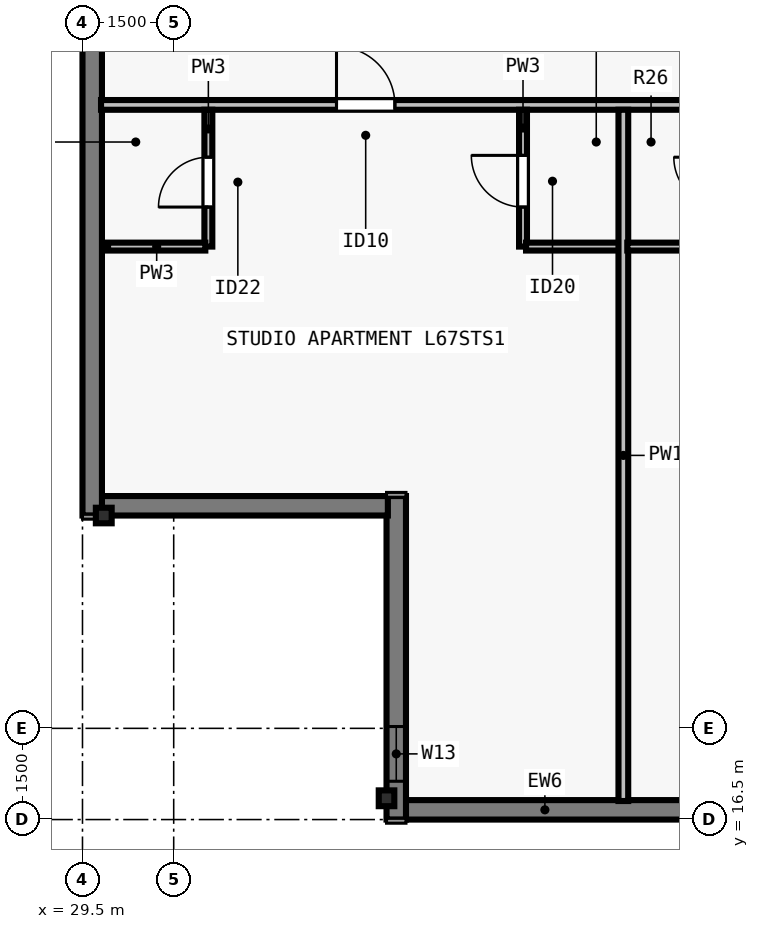
"""IFC4 building model, lengths in metres.
Left out: names, types, materials, properties, quantities, classifications, styles, units other than length and angle.
Written with IfcOpenShell. Run it as: python <this file> out.ifc"""

import sys

from ifc_helpers import new_model, si_unit, direction, frame, frame_2d, origin, origin_2d, place, context, subcontext, project, spatial, rectangle, i_section, extrude, element, fill, save


model = new_model("IFC4")
c1 = context("Model", 3, precision=1e-05, world=origin(), true_north=direction((0.0, 1.0)))
c2 = subcontext(c1, "Body", "Model", "MODEL_VIEW")
j1 = project(units=[si_unit("LENGTHUNIT", "METRE"), si_unit("PLANEANGLEUNIT", "RADIAN")], contexts=[c1])
p1 = place(None, origin())
s1 = spatial("IfcSite", under=j1, at=p1, CompositionType="ELEMENT")
p2 = place(p1, origin())
s2 = spatial("IfcBuilding", under=s1, at=p2, CompositionType="ELEMENT")
p3 = place(p2, frame((0.0, 0.0, 244.5)))
s3 = spatial("IfcBuildingStorey", under=s2, at=p3, CompositionType="ELEMENT", Elevation=244.5)
for number, where, z_axis, x_axis in (
    (1, (34.5, 16.85, 0.0), (0.0, 0.0, 1.0), (1.0, 0.0, 0.0)),
    (2, (29.85, 21.5, 0.0), (0.0, 0.0, 1.0), (0.0, 1.0, 0.0)),
):
    element("IfcColumn", number, at=place(p3, frame(where, z_axis=z_axis, x_axis=x_axis)), inside=s3, PredefinedType="COLUMN", context=c2, shape_type="SweptSolid", body=[
        extrude(i_section(OverallWidth=0.256, OverallDepth=0.26, WebThickness=0.01, FlangeThickness=0.017, FilletRadius=0.013, at=origin_2d()), origin(), (0.0, 0.0, 1.0), 3.5),
    ])
p4 = place(p3, frame((69.5, 16.66, 0.0), z_axis=(0.0, 0.0, 1.0), x_axis=(-1.0, 0.0, 0.0)))
e3 = element("IfcWall", 3, at=p4, inside=s3, PredefinedType="SOLIDWALL", context=c2, shape_type="SweptSolid", body=[
    extrude(rectangle(XDim=34.702, YDim=0.32, at=frame_2d((17.351, 0.0))), origin(), (0.0, 0.0, 1.0), 3.29),
])
p5 = place(p4, frame((4.613, 0.0, 0.8)))
e4 = element("IfcOpeningElement", 4, at=p5, cuts=e3, PredefinedType="OPENING", context=c2, shape_type="SweptSolid", body=[
    extrude(rectangle(XDim=1.85, YDim=1.678, at=frame_2d((0.925, 0.839))), frame((0.0, 0.17, 0.0), z_axis=(0.0, -1.0, 0.0), x_axis=(1.0, 0.0, 0.0)), (0.0, 0.0, 1.0), 0.34),
])
p6 = place(p4, frame((8.138, 0.0, 0.8)))
e5 = element("IfcOpeningElement", 5, at=p6, cuts=e3, PredefinedType="OPENING", context=c2, shape_type="SweptSolid", body=[
    extrude(rectangle(XDim=1.55, YDim=1.678, at=frame_2d((0.775, 0.839))), frame((0.0, 0.17, 0.0), z_axis=(0.0, -1.0, 0.0), x_axis=(1.0, 0.0, 0.0)), (0.0, 0.0, 1.0), 0.34),
])
p7 = place(p4, frame((10.113, 0.0, 0.8)))
e6 = element("IfcOpeningElement", 6, at=p7, cuts=e3, PredefinedType="OPENING", context=c2, shape_type="SweptSolid", body=[
    extrude(rectangle(XDim=1.85, YDim=1.678, at=frame_2d((0.925, 0.839))), frame((0.0, 0.17, 0.0), z_axis=(0.0, -1.0, 0.0), x_axis=(1.0, 0.0, 0.0)), (0.0, 0.0, 1.0), 0.34),
])
p8 = place(p4, frame((14.888, 0.0, 0.8)))
e7 = element("IfcOpeningElement", 7, at=p8, cuts=e3, PredefinedType="OPENING", context=c2, shape_type="SweptSolid", body=[
    extrude(rectangle(XDim=1.55, YDim=1.678, at=frame_2d((0.775, 0.839))), frame((0.0, 0.17, 0.0), z_axis=(0.0, -1.0, 0.0), x_axis=(1.0, 0.0, 0.0)), (0.0, 0.0, 1.0), 0.34),
])
p9 = place(p4, frame((18.114, 0.0, 0.8)))
e8 = element("IfcOpeningElement", 8, at=p9, cuts=e3, PredefinedType="OPENING", context=c2, shape_type="SweptSolid", body=[
    extrude(rectangle(XDim=1.85, YDim=1.678, at=frame_2d((0.925, 0.839))), frame((0.0, 0.17, 0.0), z_axis=(0.0, -1.0, 0.0), x_axis=(1.0, 0.0, 0.0)), (0.0, 0.0, 1.0), 0.34),
])
p10 = place(p4, frame((24.864, 0.0, 0.8)))
e9 = element("IfcOpeningElement", 9, at=p10, cuts=e3, PredefinedType="OPENING", context=c2, shape_type="SweptSolid", body=[
    extrude(rectangle(XDim=1.85, YDim=1.678, at=frame_2d((0.925, 0.839))), frame((0.0, 0.17, 0.0), z_axis=(0.0, -1.0, 0.0), x_axis=(1.0, 0.0, 0.0)), (0.0, 0.0, 1.0), 0.34),
])
p11 = place(p4, frame((28.389, 0.0, 0.8)))
e10 = element("IfcOpeningElement", 10, at=p11, cuts=e3, PredefinedType="OPENING", context=c2, shape_type="SweptSolid", body=[
    extrude(rectangle(XDim=1.55, YDim=1.678, at=frame_2d((0.775, 0.839))), frame((0.0, 0.17, 0.0), z_axis=(0.0, -1.0, 0.0), x_axis=(1.0, 0.0, 0.0)), (0.0, 0.0, 1.0), 0.34),
])
p12 = place(p3, frame((34.66, 16.5, 0.0), z_axis=(0.0, 0.0, 1.0), x_axis=(0.0, 1.0, 0.0)))
e11 = element("IfcWall", 11, at=p12, inside=s3, PredefinedType="SOLIDWALL", context=c2, shape_type="SweptSolid", body=[
    extrude(rectangle(XDim=5.32, YDim=0.32, at=frame_2d((2.66, 0.0))), origin(), (0.0, 0.0, 1.0), 3.29),
])
p13 = place(p12, frame((0.63, 0.0, 0.8)))
e12 = element("IfcOpeningElement", 12, at=p13, cuts=e11, PredefinedType="OPENING", context=c2, shape_type="SweptSolid", body=[
    extrude(rectangle(XDim=0.9, YDim=1.678, at=frame_2d((0.45, 0.839))), frame((0.0, 0.17, 0.0), z_axis=(0.0, -1.0, 0.0), x_axis=(1.0, 0.0, 0.0)), (0.0, 0.0, 1.0), 0.34),
])
p14 = place(p3, frame((34.522, 21.66, 0.0), z_axis=(0.0, 0.0, 1.0), x_axis=(-1.0, 0.0, 0.0)))
e13 = element("IfcWall", 13, at=p14, inside=s3, PredefinedType="SOLIDWALL", context=c2, shape_type="SweptSolid", body=[
    extrude(rectangle(XDim=4.724, YDim=0.32, at=frame_2d((2.362, 0.0))), origin(), (0.0, 0.0, 1.0), 3.29),
])
p15 = place(p3, frame((29.66, 21.5, 0.0), z_axis=(0.0, 0.0, 1.0), x_axis=(0.0, 1.0, 0.0)))
e14 = element("IfcWall", 14, at=p15, inside=s3, PredefinedType="SOLIDWALL", context=c2, shape_type="SweptSolid", body=[
    extrude(rectangle(XDim=14.602, YDim=0.32, at=frame_2d((7.301, 0.0))), origin(), (0.0, 0.0, 1.0), 3.29),
])
p16 = place(p15, frame((9.751, 0.0, 0.8)))
e15 = element("IfcOpeningElement", 15, at=p16, cuts=e14, PredefinedType="OPENING", context=c2, shape_type="SweptSolid", body=[
    extrude(rectangle(XDim=1.55, YDim=1.678, at=frame_2d((0.775, 0.839))), frame((0.0, 0.17, 0.0), z_axis=(0.0, -1.0, 0.0), x_axis=(1.0, 0.0, 0.0)), (0.0, 0.0, 1.0), 0.34),
])
p17 = place(p3, frame((29.805, 28.252, 0.0), z_axis=(0.0, 0.0, 1.0), x_axis=(1.0, 0.0, 0.0)))
e16 = element("IfcWall", 16, at=p17, inside=s3, PredefinedType="PARTITIONING", context=c2, shape_type="SweptSolid", body=[
    extrude(rectangle(XDim=44.39, YDim=0.16, at=frame_2d((22.195, 0.0))), origin(), (0.0, 0.0, 1.0), 2.958),
])
p18 = place(p17, frame((3.872, 0.0, 0.0)))
e17 = element("IfcOpeningElement", 17, at=p18, cuts=e16, PredefinedType="OPENING", context=c2, shape_type="SweptSolid", body=[
    extrude(rectangle(XDim=0.96, YDim=2.18, at=frame_2d((0.48, 1.09))), frame((0.0, 0.09, 0.0), z_axis=(0.0, -1.0, 0.0), x_axis=(1.0, 0.0, 0.0)), (0.0, 0.0, 1.0), 0.18),
])
p19 = place(p17, frame((12.828, 0.0, 0.0)))
e18 = element("IfcOpeningElement", 18, at=p19, cuts=e16, PredefinedType="OPENING", context=c2, shape_type="SweptSolid", body=[
    extrude(rectangle(XDim=0.96, YDim=2.18, at=frame_2d((0.48, 1.09))), frame((0.0, 0.09, 0.0), z_axis=(0.0, -1.0, 0.0), x_axis=(1.0, 0.0, 0.0)), (0.0, 0.0, 1.0), 0.18),
])
p20 = place(p17, frame((21.66, 0.0, 0.0)))
e19 = element("IfcOpeningElement", 19, at=p20, cuts=e16, PredefinedType="OPENING", context=c2, shape_type="SweptSolid", body=[
    extrude(rectangle(XDim=0.96, YDim=2.18, at=frame_2d((0.48, 1.09))), frame((0.0, 0.09, 0.0), z_axis=(0.0, -1.0, 0.0), x_axis=(1.0, 0.0, 0.0)), (0.0, 0.0, 1.0), 0.18),
])
p21 = place(p17, frame((30.492, 0.0, 0.0)))
e20 = element("IfcOpeningElement", 20, at=p21, cuts=e16, PredefinedType="OPENING", context=c2, shape_type="SweptSolid", body=[
    extrude(rectangle(XDim=0.96, YDim=2.18, at=frame_2d((0.48, 1.09))), frame((0.0, 0.09, 0.0), z_axis=(0.0, -1.0, 0.0), x_axis=(1.0, 0.0, 0.0)), (0.0, 0.0, 1.0), 0.18),
])
p22 = place(p17, frame((39.503, 0.0, 0.0)))
e21 = element("IfcOpeningElement", 21, at=p22, cuts=e16, PredefinedType="OPENING", context=c2, shape_type="SweptSolid", body=[
    extrude(rectangle(XDim=0.96, YDim=2.18, at=frame_2d((0.48, 1.09))), frame((0.0, 0.09, 0.0), z_axis=(0.0, -1.0, 0.0), x_axis=(1.0, 0.0, 0.0)), (0.0, 0.0, 1.0), 0.18),
])
p23 = place(p3, frame((31.57, 25.923, 0.0), z_axis=(0.0, 0.0, 1.0), x_axis=(0.0, 1.0, 0.0)))
e22 = element("IfcWall", 22, at=p23, inside=s3, PredefinedType="PLUMBINGWALL", context=c2, shape_type="SweptSolid", body=[
    extrude(rectangle(XDim=2.25, YDim=0.13, at=frame_2d((1.125, 0.0))), origin(), (0.0, 0.0, 1.0), 3.29),
])
p24 = place(p23, frame((0.65, 0.0, 0.0)))
e23 = element("IfcOpeningElement", 23, at=p24, cuts=e22, PredefinedType="OPENING", context=c2, shape_type="SweptSolid", body=[
    extrude(rectangle(XDim=0.82, YDim=2.1, at=frame_2d((0.41, 1.05))), frame((0.0, 0.075, 0.0), z_axis=(0.0, -1.0, 0.0), x_axis=(1.0, 0.0, 0.0)), (0.0, 0.0, 1.0), 0.15),
])
p25 = place(p3, frame((29.92, 25.923, 0.0), z_axis=(0.0, 0.0, 1.0), x_axis=(1.0, 0.0, 0.0)))
e24 = element("IfcWall", 24, at=p25, inside=s3, PredefinedType="PLUMBINGWALL", context=c2, shape_type="SweptSolid", body=[
    extrude(rectangle(XDim=1.6, YDim=0.13, at=frame_2d((0.8, 0.0))), origin(), (0.0, 0.0, 1.0), 3.29),
])
p26 = place(p3, frame((36.744, 25.923, 0.0), z_axis=(0.0, 0.0, 1.0), x_axis=(0.0, 1.0, 0.0)))
e25 = element("IfcWall", 25, at=p26, inside=s3, PredefinedType="PLUMBINGWALL", context=c2, shape_type="SweptSolid", body=[
    extrude(rectangle(XDim=2.25, YDim=0.13, at=frame_2d((1.125, 0.0))), origin(), (0.0, 0.0, 1.0), 3.29),
])
p27 = place(p26, frame((0.65, 0.0, 0.0)))
e26 = element("IfcOpeningElement", 26, at=p27, cuts=e25, PredefinedType="OPENING", context=c2, shape_type="SweptSolid", body=[
    extrude(rectangle(XDim=0.85, YDim=2.1, at=frame_2d((0.425, 1.05))), frame((0.0, 0.075, 0.0), z_axis=(0.0, -1.0, 0.0), x_axis=(1.0, 0.0, 0.0)), (0.0, 0.0, 1.0), 0.15),
])
p28 = place(p3, frame((36.794, 25.923, 0.0), z_axis=(0.0, 0.0, 1.0), x_axis=(1.0, 0.0, 0.0)))
e27 = element("IfcWall", 27, at=p28, inside=s3, PredefinedType="PLUMBINGWALL", context=c2, shape_type="SweptSolid", body=[
    extrude(rectangle(XDim=1.6, YDim=0.13, at=frame_2d((0.8, 0.0))), origin(), (0.0, 0.0, 1.0), 3.29),
])
p29 = place(p3, frame((38.395, 16.805, 0.0), z_axis=(0.0, 0.0, 1.0), x_axis=(0.0, 1.0, 0.0)))
e28 = element("IfcWall", 28, at=p29, inside=s3, PredefinedType="PARTITIONING", context=c2, shape_type="SweptSolid", body=[
    extrude(rectangle(XDim=11.368, YDim=0.16, at=frame_2d((5.684, 0.0))), origin(), (0.0, 0.0, 1.0), 2.573),
])
p30 = place(p3, frame((38.459, 25.923, 0.0), z_axis=(0.0, 0.0, 1.0), x_axis=(1.0, 0.0, 0.0)))
e29 = element("IfcWall", 29, at=p30, inside=s3, PredefinedType="PLUMBINGWALL", context=c2, shape_type="SweptSolid", body=[
    extrude(rectangle(XDim=1.535, YDim=0.13, at=frame_2d((0.768, 0.0))), origin(), (0.0, 0.0, 1.0), 3.29),
])
p31 = place(p13, origin())
e30 = element("IfcWindow", 30, at=p31, inside=s3, PartitioningType="SINGLE_PANEL", PredefinedType="WINDOW", context=c2, shape_type="SweptSolid", body=[
    extrude(rectangle(XDim=0.9, YDim=1.678, at=frame_2d((0.45, 0.839))), frame((0.0, -0.04, 0.0), z_axis=(0.0, -1.0, 0.0), x_axis=(1.0, 0.0, 0.0)), (0.0, 0.0, 1.0), 0.06),
])
fill(e12, e30)
p32 = place(p24, origin())
e31 = element("IfcDoor", 31, at=p32, inside=s3, OperationType="SINGLE_SWING_LEFT", PredefinedType="DOOR", context=c2, shape_type="SweptSolid", body=[
    extrude(rectangle(XDim=0.82, YDim=2.1, at=frame_2d((0.41, 1.05))), frame((0.0, 0.025, 0.0), z_axis=(0.0, -1.0, 0.0), x_axis=(1.0, 0.0, 0.0)), (0.0, 0.0, 1.0), 0.05),
])
fill(e23, e31)
p33 = place(p27, origin())
e32 = element("IfcDoor", 32, at=p33, inside=s3, OperationType="SINGLE_SWING_RIGHT", PredefinedType="DOOR", context=c2, shape_type="SweptSolid", body=[
    extrude(rectangle(XDim=0.85, YDim=2.1, at=frame_2d((0.425, 1.05))), frame((0.0, 0.025, 0.0), z_axis=(0.0, -1.0, 0.0), x_axis=(1.0, 0.0, 0.0)), (0.0, 0.0, 1.0), 0.05),
])
fill(e26, e32)
p34 = place(p18, origin())
e33 = element("IfcDoor", 33, at=p34, inside=s3, OperationType="SINGLE_SWING_LEFT", PredefinedType="DOOR", context=c2, shape_type="SweptSolid", body=[
    extrude(rectangle(XDim=0.96, YDim=2.18, at=frame_2d((0.48, 1.09))), frame((0.0, 0.025, 0.0), z_axis=(0.0, -1.0, 0.0), x_axis=(1.0, 0.0, 0.0)), (0.0, 0.0, 1.0), 0.05),
])
fill(e17, e33)
save(model, sys.argv[1])
